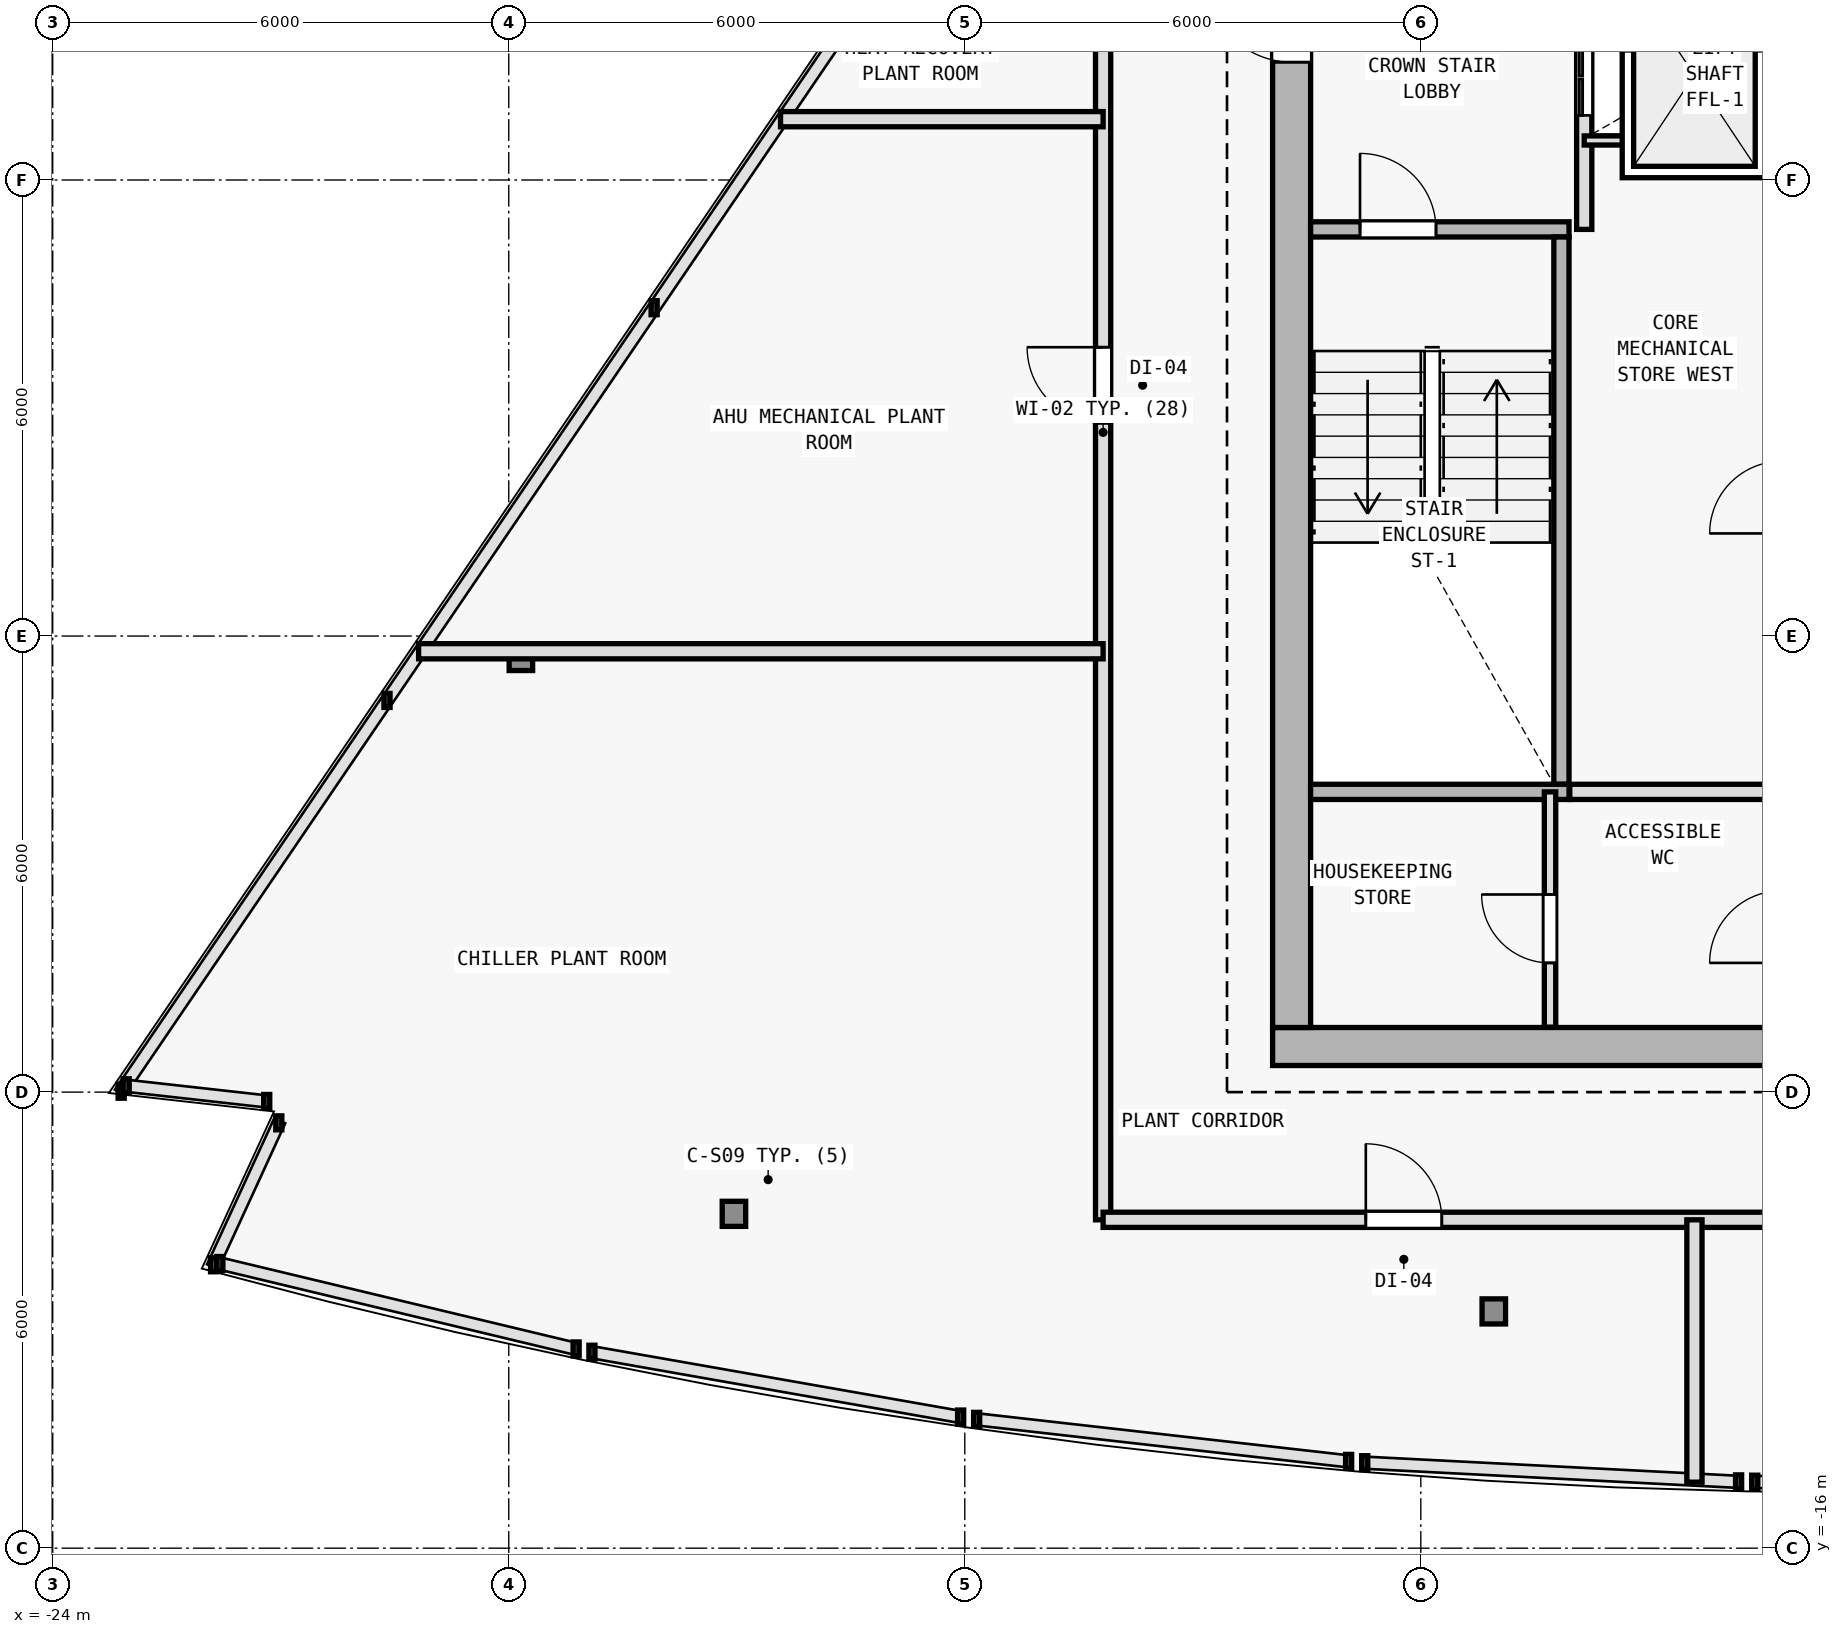
"""IFC4 building model, lengths in metres.
Left out: names, types, materials, properties, quantities, classifications, styles, units other than length and angle.
Written with IfcOpenShell. Run it as: python <this file> out.ifc"""

import sys

from ifc_helpers import new_model, si_unit, direction, frame, frame_2d, origin, origin_2d, place, context, subcontext, project, spatial, rectangle, i_section, extrude, element, fill, save


model = new_model("IFC4")
c1 = context("Model", 3, precision=1e-05, world=origin(), true_north=direction((0.0, 1.0)))
c2 = subcontext(c1, "Body", "Model", "MODEL_VIEW")
j1 = project(units=[si_unit("LENGTHUNIT", "METRE"), si_unit("PLANEANGLEUNIT", "RADIAN")], contexts=[c1])
p1 = place(None, origin())
s1 = spatial("IfcSite", under=j1, at=p1, CompositionType="ELEMENT")
p2 = place(p1, origin())
s2 = spatial("IfcBuilding", under=s1, at=p2, CompositionType="ELEMENT")
p3 = place(p2, frame((0.0, 0.0, 301.2)))
s3 = spatial("IfcBuildingStorey", under=s2, at=p3, CompositionType="ELEMENT", Elevation=301.2)
for number, where, z_axis, x_axis in (
    (1, (-7.7, -9.4, 0.0), (0.0, 0.0, 1.0), (1.0, 0.0, 0.0)),
    (2, (-7.7, 2.0, 0.0), (0.0, 0.0, 1.0), (1.0, 0.0, 0.0)),
):
    element("IfcColumn", number, at=place(p3, frame(where, z_axis=z_axis, x_axis=x_axis)), inside=s3, PredefinedType="COLUMN", context=c2, shape_type="SweptSolid", body=[
        extrude(i_section(OverallWidth=0.374, OverallDepth=0.372, WebThickness=0.012, FlangeThickness=0.02, FilletRadius=0.015, at=origin_2d()), origin(), (0.0, 0.0, 1.0), 3.6),
    ])
for number, where, z_axis, x_axis in (
    (3, (-15.037, -11.602, 0.0), (0.0, 0.0, 1.0), (1.0, 0.0, 0.0)),
    (4, (-5.04, -12.885, 0.0), (0.0, 0.0, 1.0), (1.0, 0.0, 0.0)),
    (5, (-17.84, -4.289, 0.0), (0.0, 0.0, 1.0), (1.0, 0.0, 0.0)),
):
    element("IfcColumn", number, at=place(p3, frame(where, z_axis=z_axis, x_axis=x_axis)), inside=s3, PredefinedType="COLUMN", context=c2, shape_type="SweptSolid", body=[
        extrude(i_section(OverallWidth=0.309, OverallDepth=0.33, WebThickness=0.011, FlangeThickness=0.019, FilletRadius=0.027, at=origin_2d()), origin(), (0.0, 0.0, 1.0), 3.6),
    ])
p4 = place(p3, frame((-7.95, -9.4, 0.0), z_axis=(0.0, 0.0, 1.0), x_axis=(1.0, 0.0, 0.0)))
e6 = element("IfcWall", 6, at=p4, inside=s3, PredefinedType="SHEAR", context=c2, shape_type="SweptSolid", body=[
    extrude(rectangle(XDim=15.9, YDim=0.5, at=frame_2d((7.95, 0.0))), origin(), (0.0, 0.0, 1.0), 3.34),
])
p5 = place(p4, frame((9.6, 0.0, 0.0)))
e7 = element("IfcOpeningElement", 7, at=p5, cuts=e6, PredefinedType="OPENING", context=c2, shape_type="SweptSolid", body=[
    extrude(rectangle(XDim=1.5, YDim=2.2, at=frame_2d((0.75, 1.1))), frame((0.0, 0.26, 0.0), z_axis=(0.0, -1.0, 0.0), x_axis=(1.0, 0.0, 0.0)), (0.0, 0.0, 1.0), 0.52),
])
p6 = place(p3, frame((-7.7, -9.15, 0.0), z_axis=(0.0, 0.0, 1.0), x_axis=(0.0, 1.0, 0.0)))
e8 = element("IfcWall", 8, at=p6, inside=s3, PredefinedType="SHEAR", context=c2, shape_type="SweptSolid", body=[
    extrude(rectangle(XDim=19.1, YDim=0.5, at=frame_2d((9.55, 0.0))), origin(), (0.0, 0.0, 1.0), 3.34),
])
p7 = place(p6, frame((12.7, 0.0, 0.0)))
e9 = element("IfcOpeningElement", 9, at=p7, cuts=e8, PredefinedType="OPENING", context=c2, shape_type="SweptSolid", body=[
    extrude(rectangle(XDim=1.1, YDim=2.15, at=frame_2d((0.55, 1.075))), frame((0.0, 0.26, 0.0), z_axis=(0.0, -1.0, 0.0), x_axis=(1.0, 0.0, 0.0)), (0.0, 0.0, 1.0), 0.52),
])
p8 = place(p3, frame((-7.45, 1.35, 0.0), z_axis=(0.0, 0.0, 1.0), x_axis=(1.0, 0.0, 0.0)))
e10 = element("IfcWall", 10, at=p8, inside=s3, PredefinedType="SOLIDWALL", context=c2, shape_type="SweptSolid", body=[
    extrude(rectangle(XDim=3.4, YDim=0.2, at=frame_2d((1.7, 0.0))), origin(), (0.0, 0.0, 1.0), 3.34),
])
p9 = place(p8, frame((0.65, 0.0, 0.0)))
e11 = element("IfcOpeningElement", 11, at=p9, cuts=e10, PredefinedType="OPENING", context=c2, shape_type="SweptSolid", body=[
    extrude(rectangle(XDim=1.0, YDim=2.15, at=frame_2d((0.5, 1.075))), frame((0.0, 0.11, 0.0), z_axis=(0.0, -1.0, 0.0), x_axis=(1.0, 0.0, 0.0)), (0.0, 0.0, 1.0), 0.22),
])
p10 = place(p3, frame((-4.15, -5.95, 0.0), z_axis=(0.0, 0.0, 1.0), x_axis=(0.0, 1.0, 0.0)))
e12 = element("IfcWall", 12, at=p10, inside=s3, PredefinedType="SOLIDWALL", context=c2, shape_type="SweptSolid", body=[
    extrude(rectangle(XDim=7.2, YDim=0.2, at=frame_2d((3.6, 0.0))), origin(), (0.0, 0.0, 1.0), 3.34),
])
p11 = place(p3, frame((-3.85, 1.35, 0.0), z_axis=(0.0, 0.0, 1.0), x_axis=(0.0, 1.0, 0.0)))
e13 = element("IfcWall", 13, at=p11, inside=s3, PredefinedType="SOLIDWALL", context=c2, shape_type="SweptSolid", body=[
    extrude(rectangle(XDim=8.595, YDim=0.2, at=frame_2d((4.297, 0.0))), origin(), (0.0, 0.0, 1.0), 3.34),
])
p12 = place(p11, frame((1.5, 0.0, 0.0)))
e14 = element("IfcOpeningElement", 14, at=p12, cuts=e13, PredefinedType="OPENING", context=c2, shape_type="SweptSolid", body=[
    extrude(rectangle(XDim=1.0, YDim=2.15, at=frame_2d((0.5, 1.075))), frame((0.0, 0.11, 0.0), z_axis=(0.0, -1.0, 0.0), x_axis=(1.0, 0.0, 0.0)), (0.0, 0.0, 1.0), 0.22),
])
p13 = place(p11, frame((3.18, 0.0, 0.0)))
e15 = element("IfcOpeningElement", 15, at=p13, cuts=e13, PredefinedType="OPENING", context=c2, shape_type="SweptSolid", body=[
    extrude(rectangle(XDim=1.0, YDim=2.15, at=frame_2d((0.5, 1.075))), frame((0.0, 0.11, 0.0), z_axis=(0.0, -1.0, 0.0), x_axis=(1.0, 0.0, 0.0)), (0.0, 0.0, 1.0), 0.22),
])
p14 = place(p3, frame((-3.85, 2.52, 0.0), z_axis=(0.0, 0.0, 1.0), x_axis=(1.0, 0.0, 0.0)))
e16 = element("IfcWall", 16, at=p14, inside=s3, PredefinedType="PARTITIONING", context=c2, shape_type="SweptSolid", body=[
    extrude(rectangle(XDim=2.9, YDim=0.12, at=frame_2d((1.45, 0.0))), origin(), (0.0, 0.0, 1.0), 3.34),
])
p15 = place(p3, frame((-7.45, -6.05, 0.0), z_axis=(0.0, 0.0, 1.0), x_axis=(1.0, 0.0, 0.0)))
e17 = element("IfcWall", 17, at=p15, inside=s3, PredefinedType="SOLIDWALL", context=c2, shape_type="SweptSolid", body=[
    extrude(rectangle(XDim=3.4, YDim=0.2, at=frame_2d((1.7, 0.0))), origin(), (0.0, 0.0, 1.0), 3.34),
])
p16 = place(p3, frame((-4.04, -6.05, 0.0), z_axis=(0.0, 0.0, 1.0), x_axis=(1.0, 0.0, 0.0)))
e18 = element("IfcWall", 18, at=p16, inside=s3, PredefinedType="SOLIDWALL", context=c2, shape_type="SweptSolid", body=[
    extrude(rectangle(XDim=2.79, YDim=0.2, at=frame_2d((1.395, 0.0))), origin(), (0.0, 0.0, 1.0), 3.34),
])
p17 = place(p3, frame((-4.3, -9.145, 0.0), z_axis=(0.0, 0.0, 1.0), x_axis=(0.0, 1.0, 0.0)))
e19 = element("IfcWall", 19, at=p17, inside=s3, PredefinedType="PARTITIONING", context=c2, shape_type="SweptSolid", body=[
    extrude(rectangle(XDim=3.095, YDim=0.15, at=frame_2d((1.547, 0.0))), origin(), (0.0, 0.0, 1.0), 3.34),
])
p18 = place(p17, frame((0.845, 0.0, 0.0)))
e20 = element("IfcOpeningElement", 20, at=p18, cuts=e19, PredefinedType="OPENING", context=c2, shape_type="SweptSolid", body=[
    extrude(rectangle(XDim=0.9, YDim=2.1, at=frame_2d((0.45, 1.05))), frame((0.0, 0.085, 0.0), z_axis=(0.0, -1.0, 0.0), x_axis=(1.0, 0.0, 0.0)), (0.0, 0.0, 1.0), 0.17),
])
p19 = place(p3, frame((-10.18, -11.68, 0.0), z_axis=(0.0, 0.0, 1.0), x_axis=(0.0, 1.0, 0.0)))
e21 = element("IfcWall", 21, at=p19, inside=s3, PredefinedType="SOLIDWALL", context=c2, shape_type="SweptSolid", body=[
    extrude(rectangle(XDim=20.719, YDim=0.2, at=frame_2d((10.359, 0.0))), origin(), (0.0, 0.0, 1.0), 2.995),
])
p20 = place(p19, frame((10.48, 0.0, 0.0)))
e22 = element("IfcOpeningElement", 22, at=p20, cuts=e21, PredefinedType="OPENING", context=c2, shape_type="SweptSolid", body=[
    extrude(rectangle(XDim=1.0, YDim=2.15, at=frame_2d((0.5, 1.075))), frame((0.0, 0.11, 0.0), z_axis=(0.0, -1.0, 0.0), x_axis=(1.0, 0.0, 0.0)), (0.0, 0.0, 1.0), 0.22),
])
p21 = place(p19, frame((17.033, 0.0, 0.0)))
e23 = element("IfcOpeningElement", 23, at=p21, cuts=e21, PredefinedType="OPENING", context=c2, shape_type="SweptSolid", body=[
    extrude(rectangle(XDim=1.0, YDim=2.15, at=frame_2d((0.5, 1.075))), frame((0.0, 0.11, 0.0), z_axis=(0.0, -1.0, 0.0), x_axis=(1.0, 0.0, 0.0)), (0.0, 0.0, 1.0), 0.22),
])
p22 = place(p3, frame((-10.18, -11.68, 0.0), z_axis=(0.0, 0.0, 1.0), x_axis=(1.0, 0.0, 0.0)))
e24 = element("IfcWall", 24, at=p22, inside=s3, PredefinedType="SOLIDWALL", context=c2, shape_type="SweptSolid", body=[
    extrude(rectangle(XDim=18.13, YDim=0.2, at=frame_2d((9.065, 0.0))), origin(), (0.0, 0.0, 1.0), 2.995),
])
p23 = place(p22, frame((3.456, 0.0, 0.0)))
e25 = element("IfcOpeningElement", 25, at=p23, cuts=e24, PredefinedType="OPENING", context=c2, shape_type="SweptSolid", body=[
    extrude(rectangle(XDim=1.0, YDim=2.15, at=frame_2d((0.5, 1.075))), frame((0.0, 0.11, 0.0), z_axis=(0.0, -1.0, 0.0), x_axis=(1.0, 0.0, 0.0)), (0.0, 0.0, 1.0), 0.22),
])
p24 = place(p22, frame((12.389, 0.0, 0.0)))
e26 = element("IfcOpeningElement", 26, at=p24, cuts=e24, PredefinedType="OPENING", context=c2, shape_type="SweptSolid", body=[
    extrude(rectangle(XDim=1.0, YDim=2.15, at=frame_2d((0.5, 1.075))), frame((0.0, 0.11, 0.0), z_axis=(0.0, -1.0, 0.0), x_axis=(1.0, 0.0, 0.0)), (0.0, 0.0, 1.0), 0.22),
])
p25 = place(p3, frame((-19.186, -4.2, 0.0), z_axis=(0.0, 0.0, 1.0), x_axis=(1.0, 0.0, 0.0)))
e27 = element("IfcWall", 27, at=p25, inside=s3, PredefinedType="SOLIDWALL", context=c2, shape_type="SweptSolid", body=[
    extrude(rectangle(XDim=9.006, YDim=0.2, at=frame_2d((4.503, 0.0))), origin(), (0.0, 0.0, 1.0), 2.995),
])
p26 = place(p3, frame((-14.424, 2.8, 0.0), z_axis=(0.0, 0.0, 1.0), x_axis=(1.0, 0.0, 0.0)))
e28 = element("IfcWall", 28, at=p26, inside=s3, PredefinedType="SOLIDWALL", context=c2, shape_type="SweptSolid", body=[
    extrude(rectangle(XDim=4.244, YDim=0.2, at=frame_2d((2.122, 0.0))), origin(), (0.0, 0.0, 1.0), 3.34),
])
p27 = place(p3, frame((-2.4, -15.132, 0.0), z_axis=(0.0, 0.0, 1.0), x_axis=(0.0, 1.0, 0.0)))
e29 = element("IfcWall", 29, at=p27, inside=s3, PredefinedType="SOLIDWALL", context=c2, shape_type="SweptSolid", body=[
    extrude(rectangle(XDim=3.452, YDim=0.2, at=frame_2d((1.726, 0.0))), origin(), (0.0, 0.0, 1.0), 3.34),
])
p28 = place(p7, origin())
e30 = element("IfcDoor", 30, at=p28, inside=s3, OperationType="SINGLE_SWING_RIGHT", PredefinedType="DOOR", context=c2, shape_type="SweptSolid", body=[
    extrude(rectangle(XDim=1.1, YDim=2.15, at=frame_2d((0.55, 1.075))), frame((0.0, 0.025, 0.0), z_axis=(0.0, -1.0, 0.0), x_axis=(1.0, 0.0, 0.0)), (0.0, 0.0, 1.0), 0.05),
])
fill(e9, e30)
p29 = place(p9, origin())
e31 = element("IfcDoor", 31, at=p29, inside=s3, OperationType="SINGLE_SWING_LEFT", PredefinedType="DOOR", context=c2, shape_type="SweptSolid", body=[
    extrude(rectangle(XDim=1.0, YDim=2.15, at=frame_2d((0.5, 1.075))), frame((0.0, 0.025, 0.0), z_axis=(0.0, -1.0, 0.0), x_axis=(1.0, 0.0, 0.0)), (0.0, 0.0, 1.0), 0.05),
])
fill(e11, e31)
p30 = place(p12, origin())
e32 = element("IfcDoor", 32, at=p30, inside=s3, OperationType="DOUBLE_DOOR_SLIDING", PredefinedType="DOOR", context=c2, shape_type="SweptSolid", body=[
    extrude(rectangle(XDim=1.0, YDim=2.15, at=frame_2d((0.5, 1.075))), frame((0.0, 0.025, 0.0), z_axis=(0.0, -1.0, 0.0), x_axis=(1.0, 0.0, 0.0)), (0.0, 0.0, 1.0), 0.05),
])
fill(e14, e32)
p31 = place(p18, origin())
e33 = element("IfcDoor", 33, at=p31, inside=s3, OperationType="SINGLE_SWING_RIGHT", PredefinedType="DOOR", context=c2, shape_type="SweptSolid", body=[
    extrude(rectangle(XDim=0.9, YDim=2.1, at=frame_2d((0.45, 1.05))), frame((0.0, 0.025, 0.0), z_axis=(0.0, -1.0, 0.0), x_axis=(1.0, 0.0, 0.0)), (0.0, 0.0, 1.0), 0.05),
])
fill(e20, e33)
p32 = place(p20, origin())
e34 = element("IfcDoor", 34, at=p32, inside=s3, OperationType="SINGLE_SWING_RIGHT", PredefinedType="DOOR", context=c2, shape_type="SweptSolid", body=[
    extrude(rectangle(XDim=1.0, YDim=2.15, at=frame_2d((0.5, 1.075))), frame((0.0, 0.025, 0.0), z_axis=(0.0, -1.0, 0.0), x_axis=(1.0, 0.0, 0.0)), (0.0, 0.0, 1.0), 0.05),
])
fill(e22, e34)
p33 = place(p23, origin())
e35 = element("IfcDoor", 35, at=p33, inside=s3, OperationType="SINGLE_SWING_LEFT", PredefinedType="DOOR", context=c2, shape_type="SweptSolid", body=[
    extrude(rectangle(XDim=1.0, YDim=2.15, at=frame_2d((0.5, 1.075))), frame((0.0, 0.025, 0.0), z_axis=(0.0, -1.0, 0.0), x_axis=(1.0, 0.0, 0.0)), (0.0, 0.0, 1.0), 0.05),
])
fill(e25, e35)
save(model, sys.argv[1])
